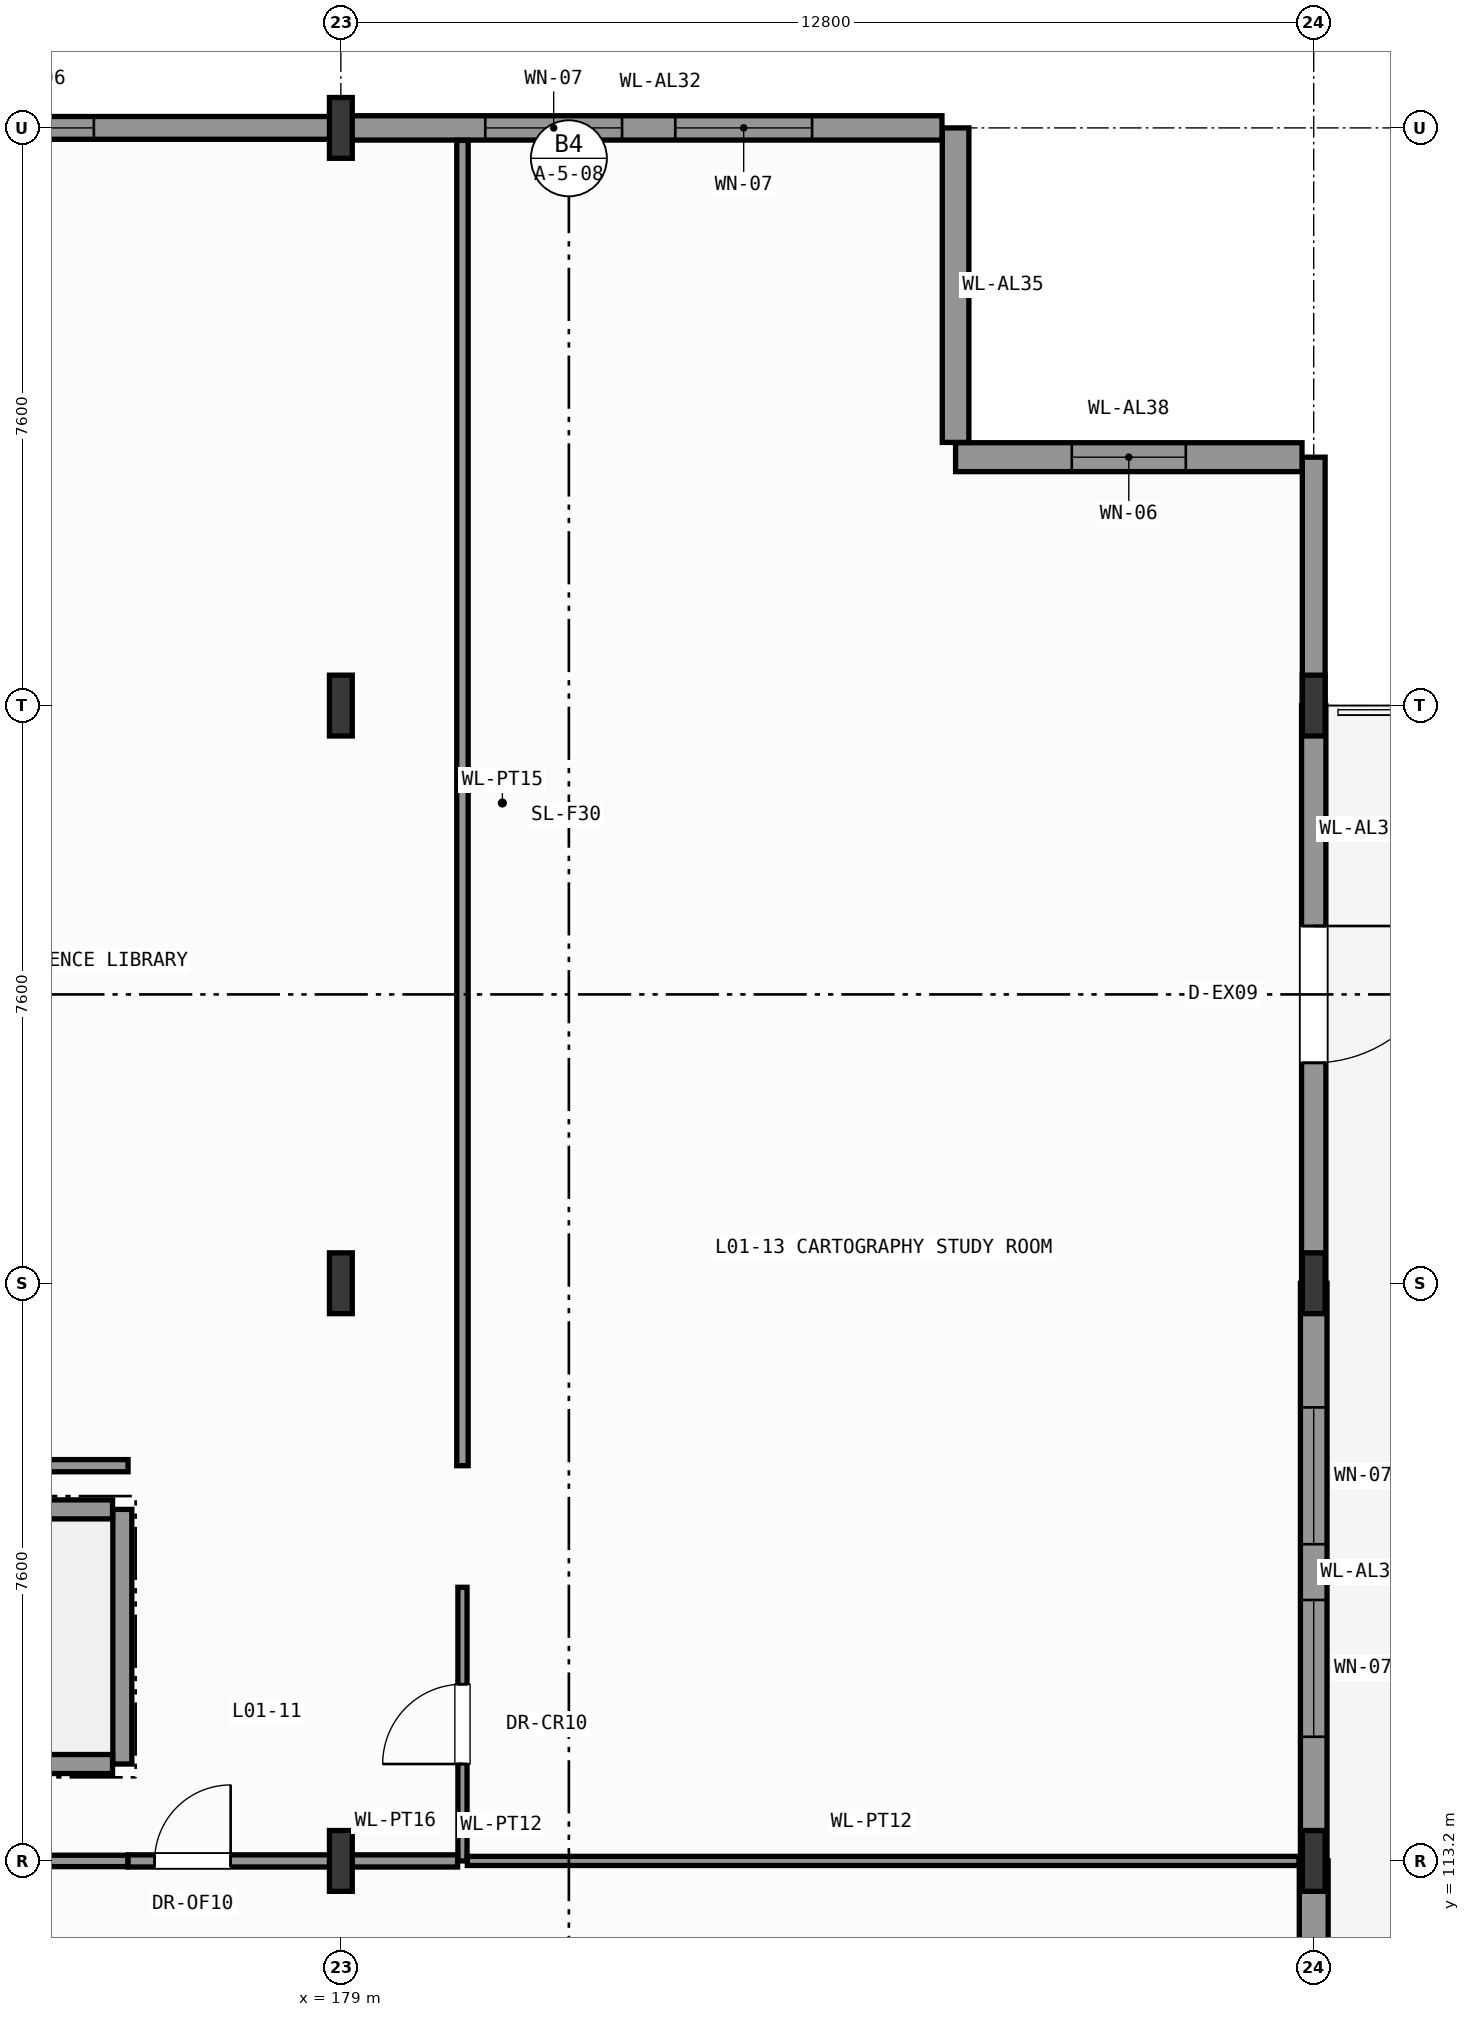
"""IFC4 building model, lengths in metres.
Left out: names, types, materials, properties, quantities, classifications, styles, units other than length and angle.
Written with IfcOpenShell. Run it as: python <this file> out.ifc"""

import sys

from ifc_helpers import new_model, si_unit, direction, frame, frame_2d, origin, origin_2d, place, context, subcontext, project, spatial, rectangle, i_section, extrude, element, fill, save


model = new_model("IFC4")
c1 = context("Model", 3, precision=1e-05, world=origin(), true_north=direction((0.0, 1.0)))
c2 = subcontext(c1, "Body", "Model", "MODEL_VIEW")
j1 = project(units=[si_unit("LENGTHUNIT", "METRE"), si_unit("PLANEANGLEUNIT", "RADIAN")], contexts=[c1])
p1 = place(None, origin())
s1 = spatial("IfcSite", under=j1, at=p1, CompositionType="ELEMENT")
p2 = place(p1, origin())
s2 = spatial("IfcBuilding", under=s1, at=p2, CompositionType="ELEMENT")
p3 = place(p2, origin())
s3 = spatial("IfcBuildingStorey", under=s2, at=p3, CompositionType="ELEMENT", Elevation=0.0)
for number, where, z_axis, x_axis in (
    (1, (179.0, 113.2, 0.0), (0.0, 0.0, 1.0), (1.0, 0.0, 0.0)),
    (2, (179.0, 120.8, 0.0), (0.0, 0.0, 1.0), (1.0, 0.0, 0.0)),
    (3, (179.0, 128.4, 0.0), (0.0, 0.0, 1.0), (1.0, 0.0, 0.0)),
    (4, (179.0, 136.0, 0.0), (0.0, 0.0, 1.0), (1.0, 0.0, 0.0)),
    (5, (191.8, 113.2, 0.0), (0.0, 0.0, 1.0), (1.0, 0.0, 0.0)),
    (6, (191.8, 120.8, 0.0), (0.0, 0.0, 1.0), (1.0, 0.0, 0.0)),
    (7, (191.8, 128.4, 0.0), (0.0, 0.0, 1.0), (1.0, 0.0, 0.0)),
):
    element("IfcColumn", number, at=place(p3, frame(where, z_axis=z_axis, x_axis=x_axis)), inside=s3, PredefinedType="COLUMN", context=c2, shape_type="SweptSolid", body=[
        extrude(i_section(OverallWidth=0.3, OverallDepth=0.8, WebThickness=0.018, FlangeThickness=0.033, FilletRadius=0.03, at=origin_2d()), origin(), (0.0, 0.0, 1.0), 7.8),
    ])
p4 = place(p3, frame((191.8, 113.2, 0.0), z_axis=(0.0, 0.0, 1.0), x_axis=(0.0, -1.0, 0.0)))
e8 = element("IfcWall", 8, at=p4, inside=s3, PredefinedType="SOLIDWALL", context=c2, shape_type="SweptSolid", body=[
    extrude(rectangle(XDim=7.6, YDim=0.38, at=frame_2d((3.8, 0.0))), origin(), (0.0, 0.0, 1.0), 7.235),
])
p5 = place(p4, frame((1.483, 0.0, 0.95)))
e9 = element("IfcOpeningElement", 9, at=p5, cuts=e8, PredefinedType="OPENING", context=c2, shape_type="SweptSolid", body=[
    extrude(rectangle(XDim=2.1, YDim=2.8, at=frame_2d((1.05, 1.4))), frame((0.0, 0.2, 0.0), z_axis=(0.0, -1.0, 0.0), x_axis=(1.0, 0.0, 0.0)), (0.0, 0.0, 1.0), 0.4),
])
p6 = place(p4, frame((4.017, 0.0, 0.95)))
e10 = element("IfcOpeningElement", 10, at=p6, cuts=e8, PredefinedType="OPENING", context=c2, shape_type="SweptSolid", body=[
    extrude(rectangle(XDim=2.1, YDim=2.8, at=frame_2d((1.05, 1.4))), frame((0.0, 0.2, 0.0), z_axis=(0.0, -1.0, 0.0), x_axis=(1.0, 0.0, 0.0)), (0.0, 0.0, 1.0), 0.4),
])
p7 = place(p3, frame((191.8, 120.8, 0.0), z_axis=(0.0, 0.0, 1.0), x_axis=(0.0, -1.0, 0.0)))
e11 = element("IfcWall", 11, at=p7, inside=s3, PredefinedType="SOLIDWALL", context=c2, shape_type="SweptSolid", body=[
    extrude(rectangle(XDim=7.6, YDim=0.35, at=frame_2d((3.8, 0.0))), origin(), (0.0, 0.0, 1.0), 7.235),
])
p8 = place(p7, frame((1.633, 0.0, 0.95)))
e12 = element("IfcOpeningElement", 12, at=p8, cuts=e11, PredefinedType="OPENING", context=c2, shape_type="SweptSolid", body=[
    extrude(rectangle(XDim=1.8, YDim=2.6, at=frame_2d((0.9, 1.3))), frame((0.0, 0.185, 0.0), z_axis=(0.0, -1.0, 0.0), x_axis=(1.0, 0.0, 0.0)), (0.0, 0.0, 1.0), 0.37),
])
p9 = place(p7, frame((4.167, 0.0, 0.95)))
e13 = element("IfcOpeningElement", 13, at=p9, cuts=e11, PredefinedType="OPENING", context=c2, shape_type="SweptSolid", body=[
    extrude(rectangle(XDim=1.8, YDim=2.6, at=frame_2d((0.9, 1.3))), frame((0.0, 0.185, 0.0), z_axis=(0.0, -1.0, 0.0), x_axis=(1.0, 0.0, 0.0)), (0.0, 0.0, 1.0), 0.37),
])
p10 = place(p3, frame((191.8, 128.4, 0.0), z_axis=(0.0, 0.0, 1.0), x_axis=(0.0, -1.0, 0.0)))
e14 = element("IfcWall", 14, at=p10, inside=s3, PredefinedType="SOLIDWALL", context=c2, shape_type="SweptSolid", body=[
    extrude(rectangle(XDim=7.6, YDim=0.32, at=frame_2d((3.8, 0.0))), origin(), (0.0, 0.0, 1.0), 7.235),
])
p11 = place(p10, frame((2.9, 0.0, 0.0)))
e15 = element("IfcOpeningElement", 15, at=p11, cuts=e14, PredefinedType="OPENING", context=c2, shape_type="SweptSolid", body=[
    extrude(rectangle(XDim=1.8, YDim=2.4, at=frame_2d((0.9, 1.2))), frame((0.0, 0.17, 0.0), z_axis=(0.0, -1.0, 0.0), x_axis=(1.0, 0.0, 0.0)), (0.0, 0.0, 1.0), 0.34),
])
p12 = place(p3, frame((191.8, 131.668, 0.0), z_axis=(0.0, 0.0, 1.0), x_axis=(0.0, -1.0, 0.0)))
e16 = element("IfcWall", 16, at=p12, inside=s3, PredefinedType="SOLIDWALL", context=c2, shape_type="SweptSolid", body=[
    extrude(rectangle(XDim=3.268, YDim=0.3, at=frame_2d((1.634, 0.0))), origin(), (0.0, 0.0, 1.0), 7.54),
])
p13 = place(p3, frame((187.088, 131.668, 0.0), z_axis=(0.0, 0.0, 1.0), x_axis=(1.0, 0.0, 0.0)))
e17 = element("IfcWall", 17, at=p13, inside=s3, PredefinedType="SOLIDWALL", context=c2, shape_type="SweptSolid", body=[
    extrude(rectangle(XDim=4.558, YDim=0.38, at=frame_2d((2.279, 0.0))), origin(), (0.0, 0.0, 1.0), 7.54),
])
p14 = place(p13, frame((1.529, 0.0, 0.95)))
e18 = element("IfcOpeningElement", 18, at=p14, cuts=e17, PredefinedType="OPENING", context=c2, shape_type="SweptSolid", body=[
    extrude(rectangle(XDim=1.5, YDim=2.4, at=frame_2d((0.75, 1.2))), frame((0.0, 0.2, 0.0), z_axis=(0.0, -1.0, 0.0), x_axis=(1.0, 0.0, 0.0)), (0.0, 0.0, 1.0), 0.4),
])
p15 = place(p3, frame((187.088, 136.0, 0.0), z_axis=(0.0, 0.0, 1.0), x_axis=(0.0, -1.0, 0.0)))
e19 = element("IfcWall", 19, at=p15, inside=s3, PredefinedType="SOLIDWALL", context=c2, shape_type="SweptSolid", body=[
    extrude(rectangle(XDim=4.138, YDim=0.35, at=frame_2d((2.069, 0.0))), origin(), (0.0, 0.0, 1.0), 7.54),
])
p16 = place(p3, frame((179.0, 136.0, 0.0), z_axis=(0.0, 0.0, 1.0), x_axis=(1.0, 0.0, 0.0)))
e20 = element("IfcWall", 20, at=p16, inside=s3, PredefinedType="SOLIDWALL", context=c2, shape_type="SweptSolid", body=[
    extrude(rectangle(XDim=7.909, YDim=0.32, at=frame_2d((3.955, 0.0))), origin(), (0.0, 0.0, 1.0), 7.54),
])
p17 = place(p16, frame((1.9, 0.0, 0.95)))
e21 = element("IfcOpeningElement", 21, at=p17, cuts=e20, PredefinedType="OPENING", context=c2, shape_type="SweptSolid", body=[
    extrude(rectangle(XDim=1.8, YDim=2.6, at=frame_2d((0.9, 1.3))), frame((0.0, 0.17, 0.0), z_axis=(0.0, -1.0, 0.0), x_axis=(1.0, 0.0, 0.0)), (0.0, 0.0, 1.0), 0.34),
])
p18 = place(p16, frame((4.4, 0.0, 0.95)))
e22 = element("IfcOpeningElement", 22, at=p18, cuts=e20, PredefinedType="OPENING", context=c2, shape_type="SweptSolid", body=[
    extrude(rectangle(XDim=1.8, YDim=2.6, at=frame_2d((0.9, 1.3))), frame((0.0, 0.17, 0.0), z_axis=(0.0, -1.0, 0.0), x_axis=(1.0, 0.0, 0.0)), (0.0, 0.0, 1.0), 0.34),
])
p19 = place(p3, frame((167.0, 136.0, 0.0), z_axis=(0.0, 0.0, 1.0), x_axis=(1.0, 0.0, 0.0)))
e23 = element("IfcWall", 23, at=p19, inside=s3, PredefinedType="SOLIDWALL", context=c2, shape_type="SweptSolid", body=[
    extrude(rectangle(XDim=12.0, YDim=0.3, at=frame_2d((6.0, 0.0))), origin(), (0.0, 0.0, 1.0), 6.925),
])
p20 = place(p19, frame((3.25, 0.0, 0.95)))
e24 = element("IfcOpeningElement", 24, at=p20, cuts=e23, PredefinedType="OPENING", context=c2, shape_type="SweptSolid", body=[
    extrude(rectangle(XDim=1.5, YDim=2.4, at=frame_2d((0.75, 1.2))), frame((0.0, 0.16, 0.0), z_axis=(0.0, -1.0, 0.0), x_axis=(1.0, 0.0, 0.0)), (0.0, 0.0, 1.0), 0.32),
])
p21 = place(p19, frame((7.25, 0.0, 0.95)))
e25 = element("IfcOpeningElement", 25, at=p21, cuts=e23, PredefinedType="OPENING", context=c2, shape_type="SweptSolid", body=[
    extrude(rectangle(XDim=1.5, YDim=2.4, at=frame_2d((0.75, 1.2))), frame((0.0, 0.16, 0.0), z_axis=(0.0, -1.0, 0.0), x_axis=(1.0, 0.0, 0.0)), (0.0, 0.0, 1.0), 0.32),
])
p22 = place(p3, frame((176.125, 114.475, 0.0), z_axis=(0.0, 0.0, 1.0), x_axis=(0.0, 1.0, 0.0)))
e26 = element("IfcWall", 26, at=p22, inside=s3, PredefinedType="SHEAR", context=c2, shape_type="SweptSolid", body=[
    extrude(rectangle(XDim=3.35, YDim=0.25, at=frame_2d((1.675, 0.0))), origin(), (0.0, 0.0, 1.0), 7.54),
])
for number, where, z_axis, x_axis in (
    (27, (168.804, 114.475, 0.0), (0.0, 0.0, 1.0), (1.0, 0.0, 0.0)),
    (28, (168.804, 117.825, 0.0), (0.0, 0.0, 1.0), (1.0, 0.0, 0.0)),
):
    element("IfcWall", number, at=place(p3, frame(where, z_axis=z_axis, x_axis=x_axis)), inside=s3, PredefinedType="SHEAR", context=c2, shape_type="SweptSolid", body=[
        extrude(rectangle(XDim=7.192, YDim=0.25, at=frame_2d((3.596, 0.0))), origin(), (0.0, 0.0, 1.0), 7.54),
    ])
p23 = place(p3, frame((167.164, 118.4, 0.0), z_axis=(0.0, 0.0, 1.0), x_axis=(1.0, 0.0, 0.0)))
e29 = element("IfcWall", 29, at=p23, inside=s3, PredefinedType="PARTITIONING", context=c2, shape_type="SweptSolid", body=[
    extrude(rectangle(XDim=9.036, YDim=0.16, at=frame_2d((4.518, 0.0))), origin(), (0.0, 0.0, 1.0), 7.54),
])
p24 = place(p23, frame((3.793, 0.0, 0.0)))
e30 = element("IfcOpeningElement", 30, at=p24, cuts=e29, PredefinedType="OPENING", context=c2, shape_type="SweptSolid", body=[
    extrude(rectangle(XDim=1.45, YDim=2.35, at=frame_2d((0.725, 1.175))), frame((0.0, 0.09, 0.0), z_axis=(0.0, -1.0, 0.0), x_axis=(1.0, 0.0, 0.0)), (0.0, 0.0, 1.0), 0.18),
])
p25 = place(p3, frame((170.4, 113.2, 0.0), z_axis=(0.0, 0.0, 1.0), x_axis=(1.0, 0.0, 0.0)))
e31 = element("IfcWall", 31, at=p25, inside=s3, PredefinedType="PARTITIONING", context=c2, shape_type="SweptSolid", body=[
    extrude(rectangle(XDim=5.8, YDim=0.15, at=frame_2d((2.9, 0.0))), origin(), (0.0, 0.0, 1.0), 6.925),
])
p26 = place(p25, frame((2.425, 0.0, 0.0)))
e32 = element("IfcOpeningElement", 32, at=p26, cuts=e31, PredefinedType="OPENING", context=c2, shape_type="SweptSolid", body=[
    extrude(rectangle(XDim=0.95, YDim=2.1, at=frame_2d((0.475, 1.05))), frame((0.0, 0.085, 0.0), z_axis=(0.0, -1.0, 0.0), x_axis=(1.0, 0.0, 0.0)), (0.0, 0.0, 1.0), 0.17),
])
p27 = place(p3, frame((180.6, 113.2, 0.0), z_axis=(0.0, 0.0, 1.0), x_axis=(0.0, 1.0, 0.0)))
e33 = element("IfcWall", 33, at=p27, inside=s3, PredefinedType="PARTITIONING", context=c2, shape_type="SweptSolid", body=[
    extrude(rectangle(XDim=3.6, YDim=0.12, at=frame_2d((1.8, 0.0))), origin(), (0.0, 0.0, 1.0), 7.54),
])
p28 = place(p27, frame((1.275, 0.0, 0.0)))
e34 = element("IfcOpeningElement", 34, at=p28, cuts=e33, PredefinedType="OPENING", context=c2, shape_type="SweptSolid", body=[
    extrude(rectangle(XDim=1.05, YDim=2.2, at=frame_2d((0.525, 1.1))), frame((0.0, 0.07, 0.0), z_axis=(0.0, -1.0, 0.0), x_axis=(1.0, 0.0, 0.0)), (0.0, 0.0, 1.0), 0.14),
])
p29 = place(p3, frame((176.2, 113.2, 0.0), z_axis=(0.0, 0.0, 1.0), x_axis=(1.0, 0.0, 0.0)))
e35 = element("IfcWall", 35, at=p29, inside=s3, PredefinedType="PARTITIONING", context=c2, shape_type="SweptSolid", body=[
    extrude(rectangle(XDim=4.336, YDim=0.16, at=frame_2d((2.168, 0.0))), origin(), (0.0, 0.0, 1.0), 6.925),
])
p30 = place(p29, frame((0.35, 0.0, 0.0)))
e36 = element("IfcOpeningElement", 36, at=p30, cuts=e35, PredefinedType="OPENING", context=c2, shape_type="SweptSolid", body=[
    extrude(rectangle(XDim=1.0, YDim=2.15, at=frame_2d((0.5, 1.075))), frame((0.0, 0.09, 0.0), z_axis=(0.0, -1.0, 0.0), x_axis=(1.0, 0.0, 0.0)), (0.0, 0.0, 1.0), 0.18),
])
p31 = place(p3, frame((180.6, 118.4, 0.0), z_axis=(0.0, 0.0, 1.0), x_axis=(0.0, 1.0, 0.0)))
e37 = element("IfcWall", 37, at=p31, inside=s3, PredefinedType="PARTITIONING", context=c2, shape_type="SweptSolid", body=[
    extrude(rectangle(XDim=17.436, YDim=0.15, at=frame_2d((8.718, 0.0))), origin(), (0.0, 0.0, 1.0), 7.54),
])
p32 = place(p3, frame((180.664, 113.2, 0.0), z_axis=(0.0, 0.0, 1.0), x_axis=(1.0, 0.0, 0.0)))
e38 = element("IfcWall", 38, at=p32, inside=s3, PredefinedType="PARTITIONING", context=c2, shape_type="SweptSolid", body=[
    extrude(rectangle(XDim=10.942, YDim=0.12, at=frame_2d((5.471, 0.0))), origin(), (0.0, 0.0, 1.0), 6.925),
])
p33 = place(p8, origin())
e39 = element("IfcWindow", 39, at=p33, inside=s3, PartitioningType="SINGLE_PANEL", PredefinedType="WINDOW", context=c2, shape_type="SweptSolid", body=[
    extrude(rectangle(XDim=1.8, YDim=2.6, at=frame_2d((0.9, 1.3))), frame((0.0, 0.03, 0.0), z_axis=(0.0, -1.0, 0.0), x_axis=(1.0, 0.0, 0.0)), (0.0, 0.0, 1.0), 0.06),
])
fill(e12, e39)
p34 = place(p9, origin())
e40 = element("IfcWindow", 40, at=p34, inside=s3, PartitioningType="SINGLE_PANEL", PredefinedType="WINDOW", context=c2, shape_type="SweptSolid", body=[
    extrude(rectangle(XDim=1.8, YDim=2.6, at=frame_2d((0.9, 1.3))), frame((0.0, 0.03, 0.0), z_axis=(0.0, -1.0, 0.0), x_axis=(1.0, 0.0, 0.0)), (0.0, 0.0, 1.0), 0.06),
])
fill(e13, e40)
p35 = place(p11, origin())
e41 = element("IfcDoor", 41, at=p35, inside=s3, OperationType="SINGLE_SWING_LEFT", PredefinedType="DOOR", context=c2, shape_type="SweptSolid", body=[
    extrude(rectangle(XDim=1.8, YDim=2.4, at=frame_2d((0.9, 1.2))), frame((0.0, 0.025, 0.0), z_axis=(0.0, -1.0, 0.0), x_axis=(1.0, 0.0, 0.0)), (0.0, 0.0, 1.0), 0.05),
])
fill(e15, e41)
p36 = place(p14, origin())
e42 = element("IfcWindow", 42, at=p36, inside=s3, PartitioningType="SINGLE_PANEL", PredefinedType="WINDOW", context=c2, shape_type="SweptSolid", body=[
    extrude(rectangle(XDim=1.5, YDim=2.4, at=frame_2d((0.75, 1.2))), frame((0.0, 0.03, 0.0), z_axis=(0.0, -1.0, 0.0), x_axis=(1.0, 0.0, 0.0)), (0.0, 0.0, 1.0), 0.06),
])
fill(e18, e42)
p37 = place(p17, origin())
e43 = element("IfcWindow", 43, at=p37, inside=s3, PartitioningType="SINGLE_PANEL", PredefinedType="WINDOW", context=c2, shape_type="SweptSolid", body=[
    extrude(rectangle(XDim=1.8, YDim=2.6, at=frame_2d((0.9, 1.3))), frame((0.0, 0.03, 0.0), z_axis=(0.0, -1.0, 0.0), x_axis=(1.0, 0.0, 0.0)), (0.0, 0.0, 1.0), 0.06),
])
fill(e21, e43)
p38 = place(p18, origin())
e44 = element("IfcWindow", 44, at=p38, inside=s3, PartitioningType="SINGLE_PANEL", PredefinedType="WINDOW", context=c2, shape_type="SweptSolid", body=[
    extrude(rectangle(XDim=1.8, YDim=2.6, at=frame_2d((0.9, 1.3))), frame((0.0, 0.03, 0.0), z_axis=(0.0, -1.0, 0.0), x_axis=(1.0, 0.0, 0.0)), (0.0, 0.0, 1.0), 0.06),
])
fill(e22, e44)
p39 = place(p21, origin())
e45 = element("IfcWindow", 45, at=p39, inside=s3, PartitioningType="SINGLE_PANEL", PredefinedType="WINDOW", context=c2, shape_type="SweptSolid", body=[
    extrude(rectangle(XDim=1.5, YDim=2.4, at=frame_2d((0.75, 1.2))), frame((0.0, 0.03, 0.0), z_axis=(0.0, -1.0, 0.0), x_axis=(1.0, 0.0, 0.0)), (0.0, 0.0, 1.0), 0.06),
])
fill(e25, e45)
p40 = place(p28, origin())
e46 = element("IfcDoor", 46, at=p40, inside=s3, OperationType="SINGLE_SWING_LEFT", PredefinedType="DOOR", context=c2, shape_type="SweptSolid", body=[
    extrude(rectangle(XDim=1.05, YDim=2.2, at=frame_2d((0.525, 1.1))), frame((0.0, 0.025, 0.0), z_axis=(0.0, -1.0, 0.0), x_axis=(1.0, 0.0, 0.0)), (0.0, 0.0, 1.0), 0.05),
])
fill(e34, e46)
p41 = place(p30, origin())
e47 = element("IfcDoor", 47, at=p41, inside=s3, OperationType="SINGLE_SWING_RIGHT", PredefinedType="DOOR", context=c2, shape_type="SweptSolid", body=[
    extrude(rectangle(XDim=1.0, YDim=2.15, at=frame_2d((0.5, 1.075))), frame((0.0, 0.025, 0.0), z_axis=(0.0, -1.0, 0.0), x_axis=(1.0, 0.0, 0.0)), (0.0, 0.0, 1.0), 0.05),
])
fill(e36, e47)
save(model, sys.argv[1])
